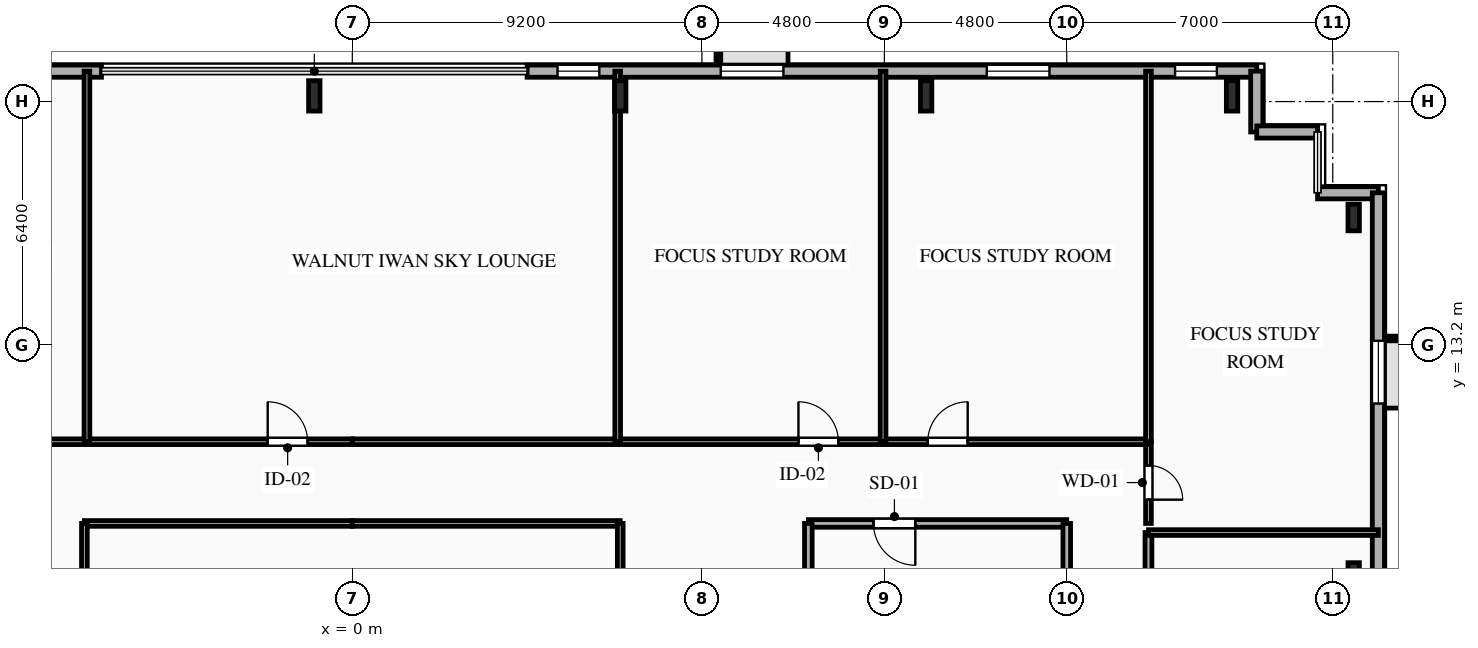
"""IFC4 building model, lengths in metres.
Left out: names, types, materials, properties, quantities, classifications, styles, units other than length and angle.
Written with IfcOpenShell. Run it as: python <this file> out.ifc"""

import sys

from ifc_helpers import new_model, si_unit, direction, frame, frame_2d, origin, origin_2d, place, context, subcontext, project, spatial, rectangle, i_section, extrude, element, fill, save


model = new_model("IFC4")
c1 = context("Model", 3, precision=1e-05, world=origin(), true_north=direction((0.0, 1.0)))
c2 = subcontext(c1, "Body", "Model", "MODEL_VIEW")
j1 = project(units=[si_unit("LENGTHUNIT", "METRE"), si_unit("PLANEANGLEUNIT", "RADIAN")], contexts=[c1])
p1 = place(None, origin())
s1 = spatial("IfcSite", under=j1, at=p1, CompositionType="ELEMENT")
p2 = place(p1, origin())
s2 = spatial("IfcBuilding", under=s1, at=p2, CompositionType="ELEMENT")
p3 = place(p2, frame((0.0, 0.0, 151.1)))
s3 = spatial("IfcBuildingStorey", under=s2, at=p3, CompositionType="ELEMENT", Elevation=151.1)
for number, where, z_axis, x_axis in (
    (1, (23.15, 19.75, 0.0), (0.0, 0.0, 1.0), (1.0, 0.0, 0.0)),
    (2, (15.1, 19.75, 0.0), (0.0, 0.0, 1.0), (1.0, 0.0, 0.0)),
    (3, (7.05, 19.75, 0.0), (0.0, 0.0, 1.0), (1.0, 0.0, 0.0)),
    (4, (-1.0, 19.75, 0.0), (0.0, 0.0, 1.0), (1.0, 0.0, 0.0)),
):
    element("IfcColumn", number, at=place(p3, frame(where, z_axis=z_axis, x_axis=x_axis)), inside=s3, PredefinedType="COLUMN", context=c2, shape_type="SweptSolid", body=[
        extrude(i_section(OverallWidth=0.3, OverallDepth=0.8, WebThickness=0.018, FlangeThickness=0.033, FilletRadius=0.03, at=origin_2d()), origin(), (0.0, 0.0, 1.0), 3.35),
    ])
for number, where, z_axis, x_axis in (
    (5, (26.35, 7.117, 0.0), (0.0, 0.0, 1.0), (1.0, 0.0, 0.0)),
    (6, (26.35, 16.55, 0.0), (0.0, 0.0, 1.0), (1.0, 0.0, 0.0)),
):
    element("IfcColumn", number, at=place(p3, frame(where, z_axis=z_axis, x_axis=x_axis)), inside=s3, PredefinedType="COLUMN", context=c2, shape_type="SweptSolid", body=[
        extrude(i_section(OverallWidth=0.3, OverallDepth=0.7, WebThickness=0.017, FlangeThickness=0.032, FilletRadius=0.027, at=origin_2d()), origin(), (0.0, 0.0, 1.0), 3.35),
    ])
p4 = place(p3, frame((-25.8, 20.4, 0.0), z_axis=(0.0, 0.0, 1.0), x_axis=(1.0, 0.0, 0.0)))
e7 = element("IfcWall", 7, at=p4, inside=s3, PredefinedType="SOLIDWALL", context=c2, shape_type="SweptSolid", body=[
    extrude(rectangle(XDim=19.2, YDim=0.32, at=frame_2d((9.6, 0.0))), origin(), (0.0, 0.0, 1.0), 3.04),
])
p5 = place(p4, frame((2.135, 0.0, 0.85)))
e8 = element("IfcOpeningElement", 8, at=p5, cuts=e7, PredefinedType="OPENING", context=c2, shape_type="SweptSolid", body=[
    extrude(rectangle(XDim=1.65, YDim=1.85, at=frame_2d((0.825, 0.925))), frame((0.0, 0.17, 0.0), z_axis=(0.0, -1.0, 0.0), x_axis=(1.0, 0.0, 0.0)), (0.0, 0.0, 1.0), 0.34),
])
p6 = place(p4, frame((10.68, 0.0, 0.85)))
e9 = element("IfcOpeningElement", 9, at=p6, cuts=e7, PredefinedType="OPENING", context=c2, shape_type="SweptSolid", body=[
    extrude(rectangle(XDim=2.4, YDim=1.95, at=frame_2d((1.2, 0.975))), frame((0.0, 0.17, 0.0), z_axis=(0.0, -1.0, 0.0), x_axis=(1.0, 0.0, 0.0)), (0.0, 0.0, 1.0), 0.34),
])
p7 = place(p3, frame((4.6, 20.4, 0.0), z_axis=(0.0, 0.0, 1.0), x_axis=(1.0, 0.0, 0.0)))
e10 = element("IfcWall", 10, at=p7, inside=s3, PredefinedType="SOLIDWALL", context=c2, shape_type="SweptSolid", body=[
    extrude(rectangle(XDim=19.2, YDim=0.32, at=frame_2d((9.6, 0.0))), origin(), (0.0, 0.0, 1.0), 3.04),
])
p8 = place(p7, frame((0.8, 0.0, 0.85)))
e11 = element("IfcOpeningElement", 11, at=p8, cuts=e10, PredefinedType="OPENING", context=c2, shape_type="SweptSolid", body=[
    extrude(rectangle(XDim=1.1, YDim=1.85, at=frame_2d((0.55, 0.925))), frame((0.0, 0.17, 0.0), z_axis=(0.0, -1.0, 0.0), x_axis=(1.0, 0.0, 0.0)), (0.0, 0.0, 1.0), 0.34),
])
p9 = place(p7, frame((5.095, 0.0, 0.85)))
e12 = element("IfcOpeningElement", 12, at=p9, cuts=e10, PredefinedType="OPENING", context=c2, shape_type="SweptSolid", body=[
    extrude(rectangle(XDim=1.65, YDim=1.85, at=frame_2d((0.825, 0.925))), frame((0.0, 0.17, 0.0), z_axis=(0.0, -1.0, 0.0), x_axis=(1.0, 0.0, 0.0)), (0.0, 0.0, 1.0), 0.34),
])
p10 = place(p7, frame((12.095, 0.0, 0.85)))
e13 = element("IfcOpeningElement", 13, at=p10, cuts=e10, PredefinedType="OPENING", context=c2, shape_type="SweptSolid", body=[
    extrude(rectangle(XDim=1.65, YDim=1.85, at=frame_2d((0.825, 0.925))), frame((0.0, 0.17, 0.0), z_axis=(0.0, -1.0, 0.0), x_axis=(1.0, 0.0, 0.0)), (0.0, 0.0, 1.0), 0.34),
])
p11 = place(p7, frame((17.05, 0.0, 0.85)))
e14 = element("IfcOpeningElement", 14, at=p11, cuts=e10, PredefinedType="OPENING", context=c2, shape_type="SweptSolid", body=[
    extrude(rectangle(XDim=1.1, YDim=1.85, at=frame_2d((0.55, 0.925))), frame((0.0, 0.17, 0.0), z_axis=(0.0, -1.0, 0.0), x_axis=(1.0, 0.0, 0.0)), (0.0, 0.0, 1.0), 0.34),
])
for number, where, z_axis, x_axis in (
    (15, (23.8, 20.4, 0.0), (0.0, 0.0, 1.0), (0.0, -1.0, 0.0)),
    (16, (23.8, 18.8, 0.0), (0.0, 0.0, 1.0), (1.0, 0.0, 0.0)),
):
    element("IfcWall", number, at=place(p3, frame(where, z_axis=z_axis, x_axis=x_axis)), inside=s3, PredefinedType="SOLIDWALL", context=c2, shape_type="SweptSolid", body=[
        extrude(rectangle(XDim=1.6, YDim=0.32, at=frame_2d((0.8, 0.0))), origin(), (0.0, 0.0, 1.0), 3.04),
    ])
p12 = place(p3, frame((25.4, 17.2, 0.0), z_axis=(0.0, 0.0, 1.0), x_axis=(1.0, 0.0, 0.0)))
e17 = element("IfcWall", 17, at=p12, inside=s3, PredefinedType="SOLIDWALL", context=c2, shape_type="SweptSolid", body=[
    extrude(rectangle(XDim=1.6, YDim=0.32, at=frame_2d((0.8, 0.0))), origin(), (0.0, 0.0, 1.0), 3.04),
])
p13 = place(p3, frame((27.0, 17.2, 0.0), z_axis=(0.0, 0.0, 1.0), x_axis=(0.0, -1.0, 0.0)))
e18 = element("IfcWall", 18, at=p13, inside=s3, PredefinedType="SOLIDWALL", context=c2, shape_type="SweptSolid", body=[
    extrude(rectangle(XDim=29.6, YDim=0.32, at=frame_2d((14.8, 0.0))), origin(), (0.0, 0.0, 1.0), 3.04),
])
p14 = place(p13, frame((3.895, 0.0, 0.85)))
e19 = element("IfcOpeningElement", 19, at=p14, cuts=e18, PredefinedType="OPENING", context=c2, shape_type="SweptSolid", body=[
    extrude(rectangle(XDim=1.65, YDim=1.85, at=frame_2d((0.825, 0.925))), frame((0.0, 0.17, 0.0), z_axis=(0.0, -1.0, 0.0), x_axis=(1.0, 0.0, 0.0)), (0.0, 0.0, 1.0), 0.34),
])
p15 = place(p13, frame((13.74, 0.0, 0.85)))
e20 = element("IfcOpeningElement", 20, at=p15, cuts=e18, PredefinedType="OPENING", context=c2, shape_type="SweptSolid", body=[
    extrude(rectangle(XDim=2.2, YDim=1.85, at=frame_2d((1.1, 0.925))), frame((0.0, 0.17, 0.0), z_axis=(0.0, -1.0, 0.0), x_axis=(1.0, 0.0, 0.0)), (0.0, 0.0, 1.0), 0.34),
])
p16 = place(p13, frame((24.135, 0.0, 0.85)))
e21 = element("IfcOpeningElement", 21, at=p16, cuts=e18, PredefinedType="OPENING", context=c2, shape_type="SweptSolid", body=[
    extrude(rectangle(XDim=1.65, YDim=1.85, at=frame_2d((0.825, 0.925))), frame((0.0, 0.17, 0.0), z_axis=(0.0, -1.0, 0.0), x_axis=(1.0, 0.0, 0.0)), (0.0, 0.0, 1.0), 0.34),
])
p17 = place(p3, frame((18.8, 8.5, 0.0), z_axis=(0.0, 0.0, 1.0), x_axis=(-1.0, 0.0, 0.0)))
e22 = element("IfcWall", 22, at=p17, inside=s3, PredefinedType="PARTITIONING", context=c2, shape_type="SweptSolid", body=[
    extrude(rectangle(XDim=6.8, YDim=0.2, at=frame_2d((3.4, 0.0))), origin(), (0.0, 0.0, 1.0), 3.04),
])
p18 = place(p17, frame((3.985, 0.0, 0.0)))
e23 = element("IfcOpeningElement", 23, at=p18, cuts=e22, PredefinedType="OPENING", context=c2, shape_type="SweptSolid", body=[
    extrude(rectangle(XDim=1.1, YDim=2.15, at=frame_2d((0.55, 1.075))), frame((0.0, 0.11, 0.0), z_axis=(0.0, -1.0, 0.0), x_axis=(1.0, 0.0, 0.0)), (0.0, 0.0, 1.0), 0.22),
])
p19 = place(p3, frame((18.8, 5.6, 0.0), z_axis=(0.0, 0.0, 1.0), x_axis=(0.0, 1.0, 0.0)))
e24 = element("IfcWall", 24, at=p19, inside=s3, PredefinedType="PARTITIONING", context=c2, shape_type="SweptSolid", body=[
    extrude(rectangle(XDim=2.9, YDim=0.2, at=frame_2d((1.45, 0.0))), origin(), (0.0, 0.0, 1.0), 2.525),
])
p20 = place(p3, frame((12.0, 8.5, 0.0), z_axis=(0.0, 0.0, 1.0), x_axis=(0.0, -1.0, 0.0)))
e25 = element("IfcWall", 25, at=p20, inside=s3, PredefinedType="PARTITIONING", context=c2, shape_type="SweptSolid", body=[
    extrude(rectangle(XDim=2.9, YDim=0.2, at=frame_2d((1.45, 0.0))), origin(), (0.0, 0.0, 1.0), 3.04),
])
p21 = place(p3, frame((-20.95, 10.65, 0.0), z_axis=(0.0, 0.0, 1.0), x_axis=(1.0, 0.0, 0.0)))
e26 = element("IfcWall", 26, at=p21, inside=s3, PredefinedType="PARTITIONING", context=c2, shape_type="SweptSolid", body=[
    extrude(rectangle(XDim=13.967, YDim=0.15, at=frame_2d((6.983, 0.0))), origin(), (0.0, 0.0, 1.0), 3.04),
])
p22 = place(p21, frame((6.458, 0.0, 0.0)))
e27 = element("IfcOpeningElement", 27, at=p22, cuts=e26, PredefinedType="OPENING", context=c2, shape_type="SweptSolid", body=[
    extrude(rectangle(XDim=1.05, YDim=2.15, at=frame_2d((0.525, 1.075))), frame((0.0, 0.085, 0.0), z_axis=(0.0, -1.0, 0.0), x_axis=(1.0, 0.0, 0.0)), (0.0, 0.0, 1.0), 0.17),
])
p23 = place(p3, frame((-6.983, 10.65, 0.0), z_axis=(0.0, 0.0, 1.0), x_axis=(1.0, 0.0, 0.0)))
e28 = element("IfcWall", 28, at=p23, inside=s3, PredefinedType="PARTITIONING", context=c2, shape_type="SweptSolid", body=[
    extrude(rectangle(XDim=6.983, YDim=0.15, at=frame_2d((3.491, 0.0))), origin(), (0.0, 0.0, 1.0), 3.04),
])
p24 = place(p23, frame((4.756, 0.0, 0.0)))
e29 = element("IfcOpeningElement", 29, at=p24, cuts=e28, PredefinedType="OPENING", context=c2, shape_type="SweptSolid", body=[
    extrude(rectangle(XDim=1.05, YDim=2.15, at=frame_2d((0.525, 1.075))), frame((0.0, 0.085, 0.0), z_axis=(0.0, -1.0, 0.0), x_axis=(1.0, 0.0, 0.0)), (0.0, 0.0, 1.0), 0.17),
])
p25 = place(p3, frame((0.0, 8.5, 0.0), z_axis=(0.0, 0.0, 1.0), x_axis=(-1.0, 0.0, 0.0)))
e30 = element("IfcWall", 30, at=p25, inside=s3, PredefinedType="PARTITIONING", context=c2, shape_type="SweptSolid", body=[
    extrude(rectangle(XDim=7.05, YDim=0.15, at=frame_2d((3.525, 0.0))), origin(), (0.0, 0.0, 1.0), 3.04),
])
p26 = place(p3, frame((20.95, 10.65, 0.0), z_axis=(0.0, 0.0, 1.0), x_axis=(0.0, -1.0, 0.0)))
e31 = element("IfcWall", 31, at=p26, inside=s3, PredefinedType="PARTITIONING", context=c2, shape_type="SweptSolid", body=[
    extrude(rectangle(XDim=2.15, YDim=0.15, at=frame_2d((1.075, 0.0))), origin(), (0.0, 0.0, 1.0), 3.04),
])
p27 = place(p26, frame((0.625, 0.0, 0.0)))
e32 = element("IfcOpeningElement", 32, at=p27, cuts=e31, PredefinedType="OPENING", context=c2, shape_type="SweptSolid", body=[
    extrude(rectangle(XDim=0.9, YDim=2.1, at=frame_2d((0.45, 1.05))), frame((0.0, 0.085, 0.0), z_axis=(0.0, -1.0, 0.0), x_axis=(1.0, 0.0, 0.0)), (0.0, 0.0, 1.0), 0.17),
])
p28 = place(p3, frame((0.0, 10.65, 0.0), z_axis=(0.0, 0.0, 1.0), x_axis=(1.0, 0.0, 0.0)))
e33 = element("IfcWall", 33, at=p28, inside=s3, PredefinedType="PARTITIONING", context=c2, shape_type="SweptSolid", body=[
    extrude(rectangle(XDim=6.983, YDim=0.15, at=frame_2d((3.491, 0.0))), origin(), (0.0, 0.0, 1.0), 3.04),
])
p29 = place(p3, frame((6.983, 10.65, 0.0), z_axis=(0.0, 0.0, 1.0), x_axis=(1.0, 0.0, 0.0)))
e34 = element("IfcWall", 34, at=p29, inside=s3, PredefinedType="PARTITIONING", context=c2, shape_type="SweptSolid", body=[
    extrude(rectangle(XDim=6.984, YDim=0.15, at=frame_2d((3.492, 0.0))), origin(), (0.0, 0.0, 1.0), 3.04),
])
p30 = place(p29, frame((4.757, 0.0, 0.0)))
e35 = element("IfcOpeningElement", 35, at=p30, cuts=e34, PredefinedType="OPENING", context=c2, shape_type="SweptSolid", body=[
    extrude(rectangle(XDim=1.05, YDim=2.15, at=frame_2d((0.525, 1.075))), frame((0.0, 0.085, 0.0), z_axis=(0.0, -1.0, 0.0), x_axis=(1.0, 0.0, 0.0)), (0.0, 0.0, 1.0), 0.17),
])
p31 = place(p3, frame((13.967, 10.65, 0.0), z_axis=(0.0, 0.0, 1.0), x_axis=(1.0, 0.0, 0.0)))
e36 = element("IfcWall", 36, at=p31, inside=s3, PredefinedType="PARTITIONING", context=c2, shape_type="SweptSolid", body=[
    extrude(rectangle(XDim=6.983, YDim=0.15, at=frame_2d((3.492, 0.0))), origin(), (0.0, 0.0, 1.0), 3.04),
])
p32 = place(p31, frame((1.177, 0.0, 0.0)))
e37 = element("IfcOpeningElement", 37, at=p32, cuts=e36, PredefinedType="OPENING", context=c2, shape_type="SweptSolid", body=[
    extrude(rectangle(XDim=1.05, YDim=2.15, at=frame_2d((0.525, 1.075))), frame((0.0, 0.085, 0.0), z_axis=(0.0, -1.0, 0.0), x_axis=(1.0, 0.0, 0.0)), (0.0, 0.0, 1.0), 0.17),
])
p33 = place(p3, frame((7.05, 8.5, 0.0), z_axis=(0.0, 0.0, 1.0), x_axis=(-1.0, 0.0, 0.0)))
e38 = element("IfcWall", 38, at=p33, inside=s3, PredefinedType="PARTITIONING", context=c2, shape_type="SweptSolid", body=[
    extrude(rectangle(XDim=7.05, YDim=0.15, at=frame_2d((3.525, 0.0))), origin(), (0.0, 0.0, 1.0), 3.04),
])
p34 = place(p3, frame((20.95, 8.26, 0.0), z_axis=(0.0, 0.0, 1.0), x_axis=(0.0, -1.0, 0.0)))
e39 = element("IfcWall", 39, at=p34, inside=s3, PredefinedType="PARTITIONING", context=c2, shape_type="SweptSolid", body=[
    extrude(rectangle(XDim=9.57, YDim=0.18, at=frame_2d((4.785, 0.0))), origin(), (0.0, 0.0, 1.0), 3.04),
])
p35 = place(p34, frame((7.064, 0.0, 0.0)))
e40 = element("IfcOpeningElement", 40, at=p35, cuts=e39, PredefinedType="OPENING", context=c2, shape_type="SweptSolid", body=[
    extrude(rectangle(XDim=1.0, YDim=2.15, at=frame_2d((0.5, 1.075))), frame((0.0, 0.1, 0.0), z_axis=(0.0, -1.0, 0.0), x_axis=(1.0, 0.0, 0.0)), (0.0, 0.0, 1.0), 0.2),
])
for number, where, z_axis, x_axis in (
    (41, (-7.05, 8.5, 0.0), (0.0, 0.0, 1.0), (0.0, -1.0, 0.0)),
    (42, (7.05, -0.8, 0.0), (0.0, 0.0, 1.0), (0.0, 1.0, 0.0)),
):
    element("IfcWall", number, at=place(p3, frame(where, z_axis=z_axis, x_axis=x_axis)), inside=s3, PredefinedType="PARTITIONING", context=c2, shape_type="SweptSolid", body=[
        extrude(rectangle(XDim=9.3, YDim=0.15, at=frame_2d((4.65, 0.0))), origin(), (0.0, 0.0, 1.0), 3.04),
    ])
p36 = place(p3, frame((20.95, 8.26, 0.0), z_axis=(0.0, 0.0, 1.0), x_axis=(1.0, 0.0, 0.0)))
e43 = element("IfcWall", 43, at=p36, inside=s3, PredefinedType="PARTITIONING", context=c2, shape_type="SweptSolid", body=[
    extrude(rectangle(XDim=6.05, YDim=0.15, at=frame_2d((3.025, 0.0))), origin(), (0.0, 0.0, 1.0), 3.04),
])
p37 = place(p3, frame((20.95, 10.65, 0.0), z_axis=(0.0, 0.0, 1.0), x_axis=(0.0, 1.0, 0.0)))
e44 = element("IfcWall", 44, at=p37, inside=s3, PredefinedType="PARTITIONING", context=c2, shape_type="SweptSolid", body=[
    extrude(rectangle(XDim=9.75, YDim=0.15, at=frame_2d((4.875, 0.0))), origin(), (0.0, 0.0, 1.0), 2.525),
])
p38 = place(p3, frame((-6.983, 20.4, 0.0), z_axis=(0.0, 0.0, 1.0), x_axis=(0.0, -1.0, 0.0)))
e45 = element("IfcWall", 45, at=p38, inside=s3, PredefinedType="PARTITIONING", context=c2, shape_type="SweptSolid", body=[
    extrude(rectangle(XDim=9.75, YDim=0.15, at=frame_2d((4.875, 0.0))), origin(), (0.0, 0.0, 1.0), 3.04),
])
p39 = place(p3, frame((6.983, 20.4, 0.0), z_axis=(0.0, 0.0, 1.0), x_axis=(0.0, -1.0, 0.0)))
e46 = element("IfcWall", 46, at=p39, inside=s3, PredefinedType="PARTITIONING", context=c2, shape_type="SweptSolid", body=[
    extrude(rectangle(XDim=9.75, YDim=0.15, at=frame_2d((4.875, 0.0))), origin(), (0.0, 0.0, 1.0), 2.525),
])
p40 = place(p3, frame((13.967, 20.4, 0.0), z_axis=(0.0, 0.0, 1.0), x_axis=(0.0, -1.0, 0.0)))
e47 = element("IfcWall", 47, at=p40, inside=s3, PredefinedType="PARTITIONING", context=c2, shape_type="SweptSolid", body=[
    extrude(rectangle(XDim=9.75, YDim=0.15, at=frame_2d((4.875, 0.0))), origin(), (0.0, 0.0, 1.0), 3.04),
])
p41 = place(p8, origin())
e48 = element("IfcWindow", 48, at=p41, inside=s3, PartitioningType="SINGLE_PANEL", PredefinedType="WINDOW", context=c2, shape_type="SweptSolid", body=[
    extrude(rectangle(XDim=1.1, YDim=1.85, at=frame_2d((0.55, 0.925))), frame((0.0, 0.03, 0.0), z_axis=(0.0, -1.0, 0.0), x_axis=(1.0, 0.0, 0.0)), (0.0, 0.0, 1.0), 0.06),
])
fill(e11, e48)
p42 = place(p9, origin())
e49 = element("IfcWindow", 49, at=p42, inside=s3, PartitioningType="SINGLE_PANEL", PredefinedType="WINDOW", context=c2, shape_type="SweptSolid", body=[
    extrude(rectangle(XDim=1.65, YDim=1.85, at=frame_2d((0.825, 0.925))), frame((0.0, 0.03, 0.0), z_axis=(0.0, -1.0, 0.0), x_axis=(1.0, 0.0, 0.0)), (0.0, 0.0, 1.0), 0.06),
])
fill(e12, e49)
p43 = place(p10, origin())
e50 = element("IfcWindow", 50, at=p43, inside=s3, PartitioningType="SINGLE_PANEL", PredefinedType="WINDOW", context=c2, shape_type="SweptSolid", body=[
    extrude(rectangle(XDim=1.65, YDim=1.85, at=frame_2d((0.825, 0.925))), frame((0.0, 0.03, 0.0), z_axis=(0.0, -1.0, 0.0), x_axis=(1.0, 0.0, 0.0)), (0.0, 0.0, 1.0), 0.06),
])
fill(e13, e50)
p44 = place(p11, origin())
e51 = element("IfcWindow", 51, at=p44, inside=s3, PartitioningType="SINGLE_PANEL", PredefinedType="WINDOW", context=c2, shape_type="SweptSolid", body=[
    extrude(rectangle(XDim=1.1, YDim=1.85, at=frame_2d((0.55, 0.925))), frame((0.0, 0.03, 0.0), z_axis=(0.0, -1.0, 0.0), x_axis=(1.0, 0.0, 0.0)), (0.0, 0.0, 1.0), 0.06),
])
fill(e14, e51)
p45 = place(p14, origin())
e52 = element("IfcWindow", 52, at=p45, inside=s3, PartitioningType="SINGLE_PANEL", PredefinedType="WINDOW", context=c2, shape_type="SweptSolid", body=[
    extrude(rectangle(XDim=1.65, YDim=1.85, at=frame_2d((0.825, 0.925))), frame((0.0, 0.03, 0.0), z_axis=(0.0, -1.0, 0.0), x_axis=(1.0, 0.0, 0.0)), (0.0, 0.0, 1.0), 0.06),
])
fill(e19, e52)
p46 = place(p18, origin())
e53 = element("IfcDoor", 53, at=p46, inside=s3, OperationType="SINGLE_SWING_LEFT", PredefinedType="DOOR", context=c2, shape_type="SweptSolid", body=[
    extrude(rectangle(XDim=1.1, YDim=2.15, at=frame_2d((0.55, 1.075))), frame((0.0, 0.025, 0.0), z_axis=(0.0, -1.0, 0.0), x_axis=(1.0, 0.0, 0.0)), (0.0, 0.0, 1.0), 0.05),
])
fill(e23, e53)
p47 = place(p24, origin())
e54 = element("IfcDoor", 54, at=p47, inside=s3, OperationType="SINGLE_SWING_LEFT", PredefinedType="DOOR", context=c2, shape_type="SweptSolid", body=[
    extrude(rectangle(XDim=1.05, YDim=2.15, at=frame_2d((0.525, 1.075))), frame((0.0, 0.025, 0.0), z_axis=(0.0, -1.0, 0.0), x_axis=(1.0, 0.0, 0.0)), (0.0, 0.0, 1.0), 0.05),
])
fill(e29, e54)
p48 = place(p27, origin())
e55 = element("IfcDoor", 55, at=p48, inside=s3, OperationType="SINGLE_SWING_RIGHT", PredefinedType="DOOR", context=c2, shape_type="SweptSolid", body=[
    extrude(rectangle(XDim=0.9, YDim=2.1, at=frame_2d((0.45, 1.05))), frame((0.0, 0.025, 0.0), z_axis=(0.0, -1.0, 0.0), x_axis=(1.0, 0.0, 0.0)), (0.0, 0.0, 1.0), 0.05),
])
fill(e32, e55)
p49 = place(p30, origin())
e56 = element("IfcDoor", 56, at=p49, inside=s3, OperationType="SINGLE_SWING_LEFT", PredefinedType="DOOR", context=c2, shape_type="SweptSolid", body=[
    extrude(rectangle(XDim=1.05, YDim=2.15, at=frame_2d((0.525, 1.075))), frame((0.0, 0.025, 0.0), z_axis=(0.0, -1.0, 0.0), x_axis=(1.0, 0.0, 0.0)), (0.0, 0.0, 1.0), 0.05),
])
fill(e35, e56)
p50 = place(p32, origin())
e57 = element("IfcDoor", 57, at=p50, inside=s3, OperationType="SINGLE_SWING_RIGHT", PredefinedType="DOOR", context=c2, shape_type="SweptSolid", body=[
    extrude(rectangle(XDim=1.05, YDim=2.15, at=frame_2d((0.525, 1.075))), frame((0.0, 0.025, 0.0), z_axis=(0.0, -1.0, 0.0), x_axis=(1.0, 0.0, 0.0)), (0.0, 0.0, 1.0), 0.05),
])
fill(e37, e57)
save(model, sys.argv[1])
